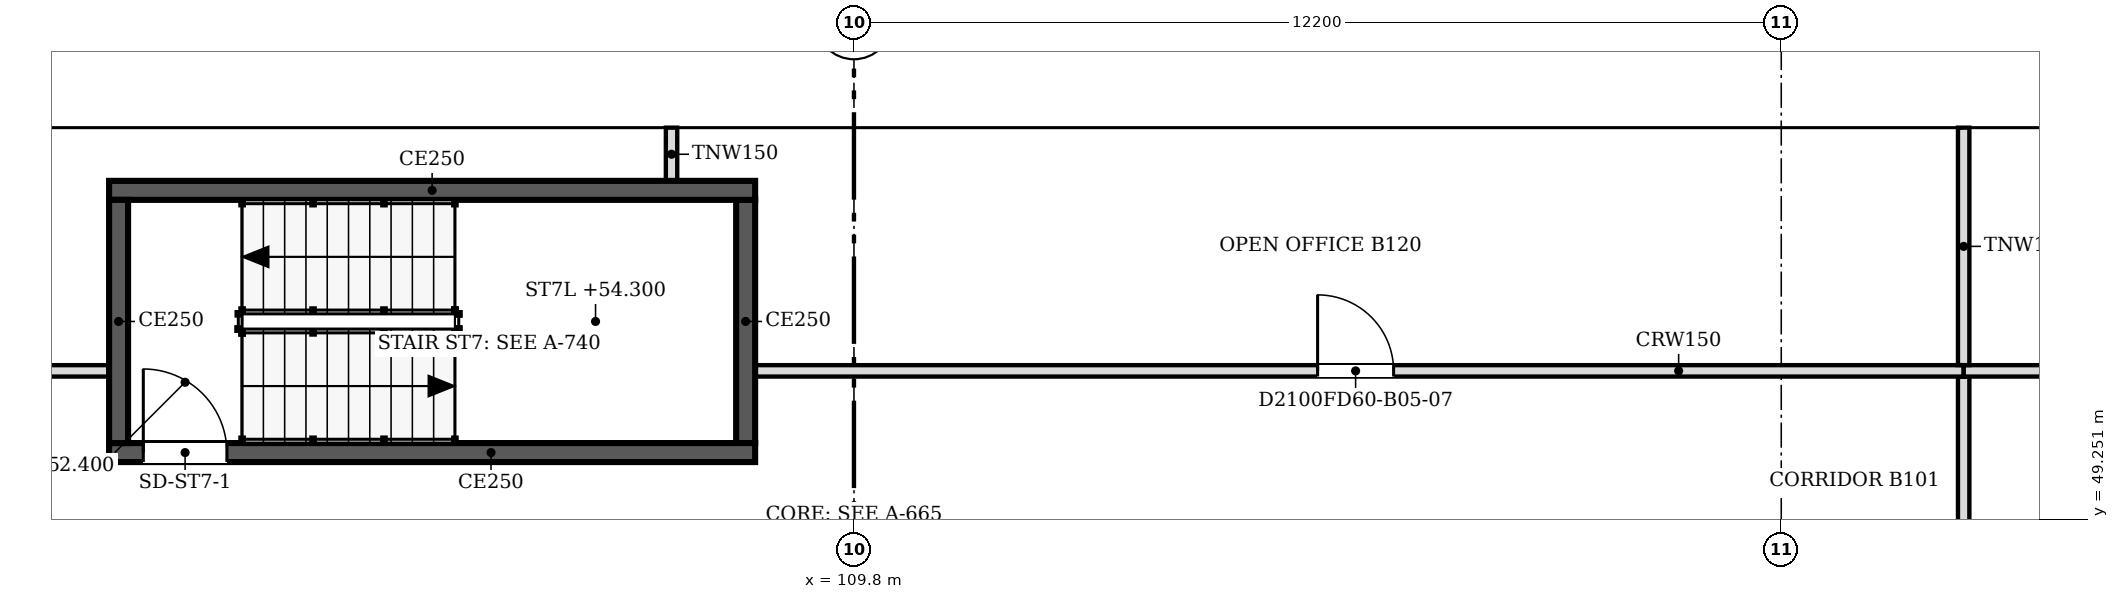
"""IFC4 building model, lengths in metres.
Left out: names, types, materials, properties, quantities, classifications, styles, units other than length and angle.
Written with IfcOpenShell. Run it as: python <this file> out.ifc"""

import sys

from ifc_helpers import new_model, si_unit, direction, frame, frame_2d, origin, place, context, subcontext, project, spatial, polyline, rectangle, outline, extrude, faceted_brep, source, transform, mapped, element, fill, save


model = new_model("IFC4")
c1 = context("Model", 3, precision=1e-05, world=origin(), true_north=direction((0.0, 1.0)))
c2 = subcontext(c1, "Body", "Model", "MODEL_VIEW")
j1 = project(units=[si_unit("LENGTHUNIT", "METRE"), si_unit("PLANEANGLEUNIT", "RADIAN")], contexts=[c1])
p1 = place(None, origin())
s1 = spatial("IfcSite", under=j1, at=p1, CompositionType="ELEMENT")
p2 = place(p1, origin())
s2 = spatial("IfcBuilding", under=s1, at=p2, CompositionType="ELEMENT")
p3 = place(p2, frame((0.0, 0.0, 52.4)))
s3 = spatial("IfcBuildingStorey", under=s2, at=p3, CompositionType="ELEMENT", Elevation=52.4)
m1 = source(origin(), c2, "Body", "Brep", [
    faceted_brep([(3.003, -0.25, 0.0), (6.053, -0.25, 3.8), (3.003, -0.25, 7.6), (0.0, -0.25, 3.8), (0.047, 0.25, 3.859), (3.003, 0.25, 7.6), (6.053, 0.25, 3.8), (3.003, 0.25, 0.0), (0.047, 0.25, 3.741), (0.0, 0.0, 3.8)], [[[0, 1, 2, 3]], [[4, 5, 6, 7, 8]], [[7, 6, 1, 0]], [[6, 5, 2, 1]], [[5, 4, 9, 3, 2]], [[8, 7, 0, 3, 9]], [[8, 9, 4]]]),
])
p4 = place(p3, frame((128.053, 54.65, -3.8), z_axis=(0.0, 0.0, 1.0), x_axis=(-1.0, 0.0, 0.0)))
e1 = element("IfcWall", 1, at=p4, inside=s3, PredefinedType="SOLIDWALL", context=c2, shape_type="MappedRepresentation", body=[
    mapped(m1, transform((0.0, 0.0, 0.0), scale=1.0)),
])
m2 = source(origin(), c2, "Body", "SweptSolid", [
    extrude(outline(polyline([(3.005, 0.401), (5.733, 3.8), (3.005, 7.199), (0.319, 3.8), (3.005, 0.401)])), frame((0.0, 0.26, 0.0), z_axis=(0.0, -1.0, 0.0), x_axis=(1.0, 0.0, 0.0)), (0.0, 0.0, 1.0), 0.52),
])
p5 = place(p4, origin())
e2 = element("IfcOpeningElement", 2, at=p5, cuts=e1, PredefinedType="OPENING", context=c2, shape_type="MappedRepresentation", body=[
    mapped(m2, transform((0.0, 0.0, 0.0), scale=1.0)),
])
m3 = source(origin(), c2, "Body", "SweptSolid", [
    extrude(outline(polyline([(3.05, 0.0), (6.1, 3.8), (3.05, 7.6), (0.0, 3.8), (3.05, 0.0)])), frame((0.0, 0.25, 0.0), z_axis=(0.0, -1.0, 0.0), x_axis=(1.0, 0.0, 0.0)), (0.0, 0.0, 1.0), 0.5),
])
p6 = place(p3, frame((122.0, 54.65, -3.8), z_axis=(0.0, 0.0, 1.0), x_axis=(-1.0, 0.0, 0.0)))
e3 = element("IfcWall", 3, at=p6, inside=s3, PredefinedType="SOLIDWALL", context=c2, shape_type="MappedRepresentation", body=[
    mapped(m3, transform((0.0, 0.0, 0.0), scale=1.0)),
])
m4 = source(origin(), c2, "Body", "SweptSolid", [
    extrude(outline(polyline([(3.05, 0.399), (5.78, 3.8), (3.05, 7.2), (0.321, 3.8), (3.05, 0.399)])), frame((0.0, 0.26, 0.0), z_axis=(0.0, -1.0, 0.0), x_axis=(1.0, 0.0, 0.0)), (0.0, 0.0, 1.0), 0.52),
])
p7 = place(p6, origin())
e4 = element("IfcOpeningElement", 4, at=p7, cuts=e3, PredefinedType="OPENING", context=c2, shape_type="MappedRepresentation", body=[
    mapped(m4, transform((0.0, 0.0, 0.0), scale=1.0)),
])
m5 = source(origin(), c2, "Body", "Brep", [
    faceted_brep([(3.05, -0.25, 0.0), (6.1, -0.25, 3.8), (6.1, -0.25, 3.8), (3.05, -0.25, 7.6), (0.0, -0.25, 3.8), (0.0, 0.25, 3.8), (3.05, 0.25, 7.6), (6.1, 0.25, 3.8), (6.1, 0.25, 3.8), (3.05, 0.25, 0.0)], [[[0, 1, 2, 3, 4]], [[5, 6, 7, 8, 9]], [[9, 8, 1, 0]], [[7, 6, 3, 2]], [[6, 5, 4, 3]], [[5, 9, 0, 4]], [[1, 8, 7, 2]]]),
])
p8 = place(p3, frame((115.9, 54.65, -3.8), z_axis=(0.0, 0.0, 1.0), x_axis=(-1.0, 0.0, 0.0)))
e5 = element("IfcWall", 5, at=p8, inside=s3, PredefinedType="SOLIDWALL", context=c2, shape_type="MappedRepresentation", body=[
    mapped(m5, transform((0.0, 0.0, 0.0), scale=1.0)),
])
p9 = place(p8, origin())
e6 = element("IfcOpeningElement", 6, at=p9, cuts=e5, PredefinedType="OPENING", context=c2, shape_type="MappedRepresentation", body=[
    mapped(m4, transform((0.0, 0.0, 0.0), scale=1.0)),
])
p10 = place(p3, frame((109.8, 54.65, -3.8), z_axis=(0.0, 0.0, 1.0), x_axis=(-1.0, 0.0, 0.0)))
e7 = element("IfcWall", 7, at=p10, inside=s3, PredefinedType="SOLIDWALL", context=c2, shape_type="MappedRepresentation", body=[
    mapped(m3, transform((0.0, 0.0, 0.0), scale=1.0)),
])
p11 = place(p10, origin())
e8 = element("IfcOpeningElement", 8, at=p11, cuts=e7, PredefinedType="OPENING", context=c2, shape_type="MappedRepresentation", body=[
    mapped(m4, transform((0.0, 0.0, 0.0), scale=1.0)),
])
p12 = place(p3, frame((103.7, 54.65, -3.8), z_axis=(0.0, 0.0, 1.0), x_axis=(-1.0, 0.0, 0.0)))
e9 = element("IfcWall", 9, at=p12, inside=s3, PredefinedType="SOLIDWALL", context=c2, shape_type="MappedRepresentation", body=[
    mapped(m5, transform((0.0, 0.0, 0.0), scale=1.0)),
])
p13 = place(p12, origin())
e10 = element("IfcOpeningElement", 10, at=p13, cuts=e9, PredefinedType="OPENING", context=c2, shape_type="MappedRepresentation", body=[
    mapped(m4, transform((0.0, 0.0, 0.0), scale=1.0)),
])
p14 = place(p2, frame((0.0, 0.0, 56.2)))
s4 = spatial("IfcBuildingStorey", under=s2, at=p14, CompositionType="ELEMENT", Elevation=56.2)
m6 = source(origin(), c2, "Body", "Brep", [
    faceted_brep([(0.047, -0.25, 0.0), (3.05, -0.25, 3.8), (0.047, -0.25, 7.6), (0.0, -0.25, 7.54), (0.0, -0.25, 0.06), (0.093, 0.25, 7.541), (3.05, 0.25, 3.8), (0.093, 0.25, 0.059), (0.047, 0.0, 0.0), (0.047, 0.0, 7.6)], [[[0, 1, 2, 3, 4]], [[5, 6, 7]], [[7, 6, 1, 0, 8]], [[6, 5, 9, 2, 1]], [[3, 2, 9]], [[8, 0, 4]], [[7, 8, 4, 3, 9, 5]]]),
])
p15 = place(p14, frame((128.1, 54.65, -3.8), z_axis=(0.0, 0.0, 1.0), x_axis=(-1.0, 0.0, 0.0)))
e11 = element("IfcWall", 11, at=p15, inside=s4, PredefinedType="SOLIDWALL", context=c2, shape_type="MappedRepresentation", body=[
    mapped(m6, transform((0.0, 0.0, 0.0), scale=1.0)),
])
m7 = source(origin(), c2, "Body", "SweptSolid", [
    extrude(outline(polyline([(0.247, 0.656), (2.731, 3.8), (0.247, 6.944), (0.247, 0.656)])), frame((0.0, 0.26, 0.0), z_axis=(0.0, -1.0, 0.0), x_axis=(1.0, 0.0, 0.0)), (0.0, 0.0, 1.0), 0.52),
])
p16 = place(p15, origin())
e12 = element("IfcOpeningElement", 12, at=p16, cuts=e11, PredefinedType="OPENING", context=c2, shape_type="MappedRepresentation", body=[
    mapped(m7, transform((0.0, 0.0, 0.0), scale=1.0)),
])
m8 = source(origin(), c2, "Body", "SweptSolid", [
    extrude(outline(polyline([(3.05, 0.0), (6.1, 3.8), (3.05, 7.6), (0.0, 3.8), (3.05, 0.0)])), frame((0.0, 0.25, 0.0), z_axis=(0.0, -1.0, 0.0), x_axis=(1.0, 0.0, 0.0)), (0.0, 0.0, 1.0), 0.5),
])
p17 = place(p14, frame((125.05, 54.65, -3.8), z_axis=(0.0, 0.0, 1.0), x_axis=(-1.0, 0.0, 0.0)))
e13 = element("IfcWall", 13, at=p17, inside=s4, PredefinedType="SOLIDWALL", context=c2, shape_type="MappedRepresentation", body=[
    mapped(m8, transform((0.0, 0.0, 0.0), scale=1.0)),
])
m9 = source(origin(), c2, "Body", "SweptSolid", [
    extrude(outline(polyline([(3.05, 0.399), (5.78, 3.8), (3.05, 7.201), (0.321, 3.8), (3.05, 0.399)])), frame((0.0, 0.26, 0.0), z_axis=(0.0, -1.0, 0.0), x_axis=(1.0, 0.0, 0.0)), (0.0, 0.0, 1.0), 0.52),
])
p18 = place(p17, origin())
e14 = element("IfcOpeningElement", 14, at=p18, cuts=e13, PredefinedType="OPENING", context=c2, shape_type="MappedRepresentation", body=[
    mapped(m9, transform((0.0, 0.0, 0.0), scale=1.0)),
])
m10 = source(origin(), c2, "Body", "Brep", [
    faceted_brep([(3.05, -0.25, 0.0), (6.1, -0.25, 3.8), (6.1, -0.25, 3.8), (3.05, -0.25, 7.6), (0.0, -0.25, 3.8), (0.0, 0.25, 3.8), (3.05, 0.25, 7.6), (6.1, 0.25, 3.8), (6.1, 0.25, 3.8), (3.05, 0.25, 0.0)], [[[0, 1, 2, 3, 4]], [[5, 6, 7, 8, 9]], [[9, 8, 1, 0]], [[7, 6, 3, 2]], [[6, 5, 4, 3]], [[5, 9, 0, 4]], [[1, 8, 7, 2]]]),
])
p19 = place(p14, frame((118.95, 54.65, -3.8), z_axis=(0.0, 0.0, 1.0), x_axis=(-1.0, 0.0, 0.0)))
e15 = element("IfcWall", 15, at=p19, inside=s4, PredefinedType="SOLIDWALL", context=c2, shape_type="MappedRepresentation", body=[
    mapped(m10, transform((0.0, 0.0, 0.0), scale=1.0)),
])
p20 = place(p19, origin())
e16 = element("IfcOpeningElement", 16, at=p20, cuts=e15, PredefinedType="OPENING", context=c2, shape_type="MappedRepresentation", body=[
    mapped(m9, transform((0.0, 0.0, 0.0), scale=1.0)),
])
p21 = place(p14, frame((112.85, 54.65, -3.8), z_axis=(0.0, 0.0, 1.0), x_axis=(-1.0, 0.0, 0.0)))
e17 = element("IfcWall", 17, at=p21, inside=s4, PredefinedType="SOLIDWALL", context=c2, shape_type="MappedRepresentation", body=[
    mapped(m8, transform((0.0, 0.0, 0.0), scale=1.0)),
])
p22 = place(p21, origin())
e18 = element("IfcOpeningElement", 18, at=p22, cuts=e17, PredefinedType="OPENING", context=c2, shape_type="MappedRepresentation", body=[
    mapped(m9, transform((0.0, 0.0, 0.0), scale=1.0)),
])
p23 = place(p14, frame((106.75, 54.65, -3.8), z_axis=(0.0, 0.0, 1.0), x_axis=(-1.0, 0.0, 0.0)))
e19 = element("IfcWall", 19, at=p23, inside=s4, PredefinedType="SOLIDWALL", context=c2, shape_type="MappedRepresentation", body=[
    mapped(m8, transform((0.0, 0.0, 0.0), scale=1.0)),
])
p24 = place(p23, origin())
e20 = element("IfcOpeningElement", 20, at=p24, cuts=e19, PredefinedType="OPENING", context=c2, shape_type="MappedRepresentation", body=[
    mapped(m9, transform((0.0, 0.0, 0.0), scale=1.0)),
])
p25 = place(p14, frame((100.65, 54.65, -3.8), z_axis=(0.0, 0.0, 1.0), x_axis=(-1.0, 0.0, 0.0)))
e21 = element("IfcWall", 21, at=p25, inside=s4, PredefinedType="SOLIDWALL", context=c2, shape_type="MappedRepresentation", body=[
    mapped(m10, transform((0.0, 0.0, 0.0), scale=1.0)),
])
p26 = place(p25, origin())
e22 = element("IfcOpeningElement", 22, at=p26, cuts=e21, PredefinedType="OPENING", context=c2, shape_type="MappedRepresentation", body=[
    mapped(m9, transform((0.0, 0.0, 0.0), scale=1.0)),
])
p27 = place(p3, frame((108.5, 50.125, 0.0), z_axis=(0.0, 0.0, 1.0), x_axis=(-1.0, 0.0, 0.0)))
e23 = element("IfcWall", 23, at=p27, inside=s3, PredefinedType="SOLIDWALL", context=c2, shape_type="SweptSolid", body=[
    extrude(rectangle(XDim=8.5, YDim=0.25, at=frame_2d((4.25, 0.0))), origin(), (0.0, 0.0, 1.0), 3.8),
])
m11 = source(origin(), c2, "Body", "SweptSolid", [
    extrude(rectangle(XDim=1.1, YDim=2.1, at=frame_2d((0.55, 1.05))), frame((0.0, 0.135, 0.0), z_axis=(0.0, -1.0, 0.0), x_axis=(1.0, 0.0, 0.0)), (0.0, 0.0, 1.0), 0.27),
])
p28 = place(p27, frame((6.95, 0.0, 0.0)))
e24 = element("IfcOpeningElement", 24, at=p28, cuts=e23, PredefinedType="OPENING", context=c2, shape_type="MappedRepresentation", body=[
    mapped(m11, transform((0.0, 0.0, 0.0), scale=1.0)),
])
p29 = place(p3, frame((100.125, 50.25, 0.0), z_axis=(0.0, 0.0, 1.0), x_axis=(0.0, 1.0, 0.0)))
e25 = element("IfcWall", 25, at=p29, inside=s3, PredefinedType="SOLIDWALL", context=c2, shape_type="SweptSolid", body=[
    extrude(rectangle(XDim=3.2, YDim=0.25, at=frame_2d((1.6, 0.0))), origin(), (0.0, 0.0, 1.0), 3.8),
])
p30 = place(p3, frame((100.0, 53.575, 0.0), z_axis=(0.0, 0.0, 1.0), x_axis=(1.0, 0.0, 0.0)))
e26 = element("IfcWall", 26, at=p30, inside=s3, PredefinedType="SOLIDWALL", context=c2, shape_type="SweptSolid", body=[
    extrude(rectangle(XDim=8.5, YDim=0.25, at=frame_2d((4.25, 0.0))), origin(), (0.0, 0.0, 1.0), 3.8),
])
p31 = place(p3, frame((108.375, 53.45, 0.0), z_axis=(0.0, 0.0, 1.0), x_axis=(0.0, -1.0, 0.0)))
e27 = element("IfcWall", 27, at=p31, inside=s3, PredefinedType="SOLIDWALL", context=c2, shape_type="SweptSolid", body=[
    extrude(rectangle(XDim=3.2, YDim=0.25, at=frame_2d((1.6, 0.0))), origin(), (0.0, 0.0, 1.0), 3.8),
])
p32 = place(p3, frame((124.4, 51.124, 0.0), z_axis=(0.0, 0.0, 1.0), x_axis=(0.0, -1.0, 0.0)))
e28 = element("IfcWall", 28, at=p32, inside=s3, PredefinedType="PARTITIONING", context=c2, shape_type="SweptSolid", body=[
    extrude(rectangle(XDim=14.524, YDim=0.15, at=frame_2d((7.262, 0.0))), origin(), (0.0, 0.0, 1.0), 3.067),
])
m12 = source(origin(), c2, "Body", "SweptSolid", [
    extrude(rectangle(XDim=1.0, YDim=2.1, at=frame_2d((0.5, 1.05))), frame((0.0, 0.085, 0.0), z_axis=(0.0, -1.0, 0.0), x_axis=(1.0, 0.0, 0.0)), (0.0, 0.0, 1.0), 0.17),
])
p33 = place(p32, frame((3.724, 0.0, 0.0)))
e29 = element("IfcOpeningElement", 29, at=p33, cuts=e28, PredefinedType="OPENING", context=c2, shape_type="MappedRepresentation", body=[
    mapped(m12, transform((0.0, 0.0, 0.0), scale=1.0)),
])
p34 = place(p3, frame((95.276, 51.2, 0.0), z_axis=(0.0, 0.0, 1.0), x_axis=(1.0, 0.0, 0.0)))
e30 = element("IfcWall", 30, at=p34, inside=s3, PredefinedType="PARTITIONING", context=c2, shape_type="SweptSolid", body=[
    extrude(rectangle(XDim=4.724, YDim=0.15, at=frame_2d((2.362, 0.0))), origin(), (0.0, 0.0, 1.0), 3.067),
])
p35 = place(p34, frame((1.9, 0.0, 0.0)))
e31 = element("IfcOpeningElement", 31, at=p35, cuts=e30, PredefinedType="OPENING", context=c2, shape_type="MappedRepresentation", body=[
    mapped(m12, transform((0.0, 0.0, 0.0), scale=1.0)),
])
p36 = place(p3, frame((108.5, 51.2, 0.0), z_axis=(0.0, 0.0, 1.0), x_axis=(1.0, 0.0, 0.0)))
e32 = element("IfcWall", 32, at=p36, inside=s3, PredefinedType="PARTITIONING", context=c2, shape_type="SweptSolid", body=[
    extrude(rectangle(XDim=15.9, YDim=0.15, at=frame_2d((7.95, 0.0))), origin(), (0.0, 0.0, 1.0), 3.067),
])
p37 = place(p36, frame((7.4, 0.0, 0.0)))
e33 = element("IfcOpeningElement", 33, at=p37, cuts=e32, PredefinedType="OPENING", context=c2, shape_type="MappedRepresentation", body=[
    mapped(m12, transform((0.0, 0.0, 0.0), scale=1.0)),
])
p38 = place(p3, frame((124.401, 51.2, 0.0), z_axis=(0.0, 0.0, 1.0), x_axis=(1.0, 0.0, 0.0)))
e34 = element("IfcWall", 34, at=p38, inside=s3, PredefinedType="PARTITIONING", context=c2, shape_type="SweptSolid", body=[
    extrude(rectangle(XDim=4.549, YDim=0.15, at=frame_2d((2.274, 0.0))), origin(), (0.0, 0.0, 1.0), 3.067),
])
m13 = source(origin(), c2, "Body", "SweptSolid", [
    extrude(rectangle(XDim=0.9, YDim=2.1, at=frame_2d((0.45, 1.05))), frame((0.0, 0.085, 0.0), z_axis=(0.0, -1.0, 0.0), x_axis=(1.0, 0.0, 0.0)), (0.0, 0.0, 1.0), 0.17),
])
p39 = place(p38, frame((1.8, 0.0, 0.0)))
e35 = element("IfcOpeningElement", 35, at=p39, cuts=e34, PredefinedType="OPENING", context=c2, shape_type="MappedRepresentation", body=[
    mapped(m13, transform((0.0, 0.0, 0.0), scale=1.0)),
])
p40 = place(p3, frame((124.4, 51.276, 0.0), z_axis=(0.0, 0.0, 1.0), x_axis=(0.0, 1.0, 0.0)))
e36 = element("IfcWall", 36, at=p40, inside=s3, PredefinedType="PARTITIONING", context=c2, shape_type="SweptSolid", body=[
    extrude(rectangle(XDim=3.124, YDim=0.15, at=frame_2d((1.562, 0.0))), origin(), (0.0, 0.0, 1.0), 3.067),
])
p41 = place(p3, frame((107.4, 53.7, 0.0), z_axis=(0.0, 0.0, 1.0), x_axis=(0.0, 1.0, 0.0)))
e37 = element("IfcWall", 37, at=p41, inside=s3, PredefinedType="PARTITIONING", context=c2, shape_type="SweptSolid", body=[
    extrude(rectangle(XDim=0.7, YDim=0.15, at=frame_2d((0.35, 0.0))), origin(), (0.0, 0.0, 1.0), 3.067),
])
m14 = source(origin(), c2, "Body", "SweptSolid", [
    extrude(rectangle(XDim=1.1, YDim=2.1, at=frame_2d((0.55, 1.05))), frame((0.0, 0.025, 0.0), z_axis=(0.0, -1.0, 0.0), x_axis=(1.0, 0.0, 0.0)), (0.0, 0.0, 1.0), 0.05),
])
p42 = place(p28, origin())
e38 = element("IfcDoor", 38, at=p42, inside=s3, OperationType="SINGLE_SWING_RIGHT", PredefinedType="DOOR", context=c2, shape_type="MappedRepresentation", body=[
    mapped(m14, transform((0.0, 0.0, 0.0), scale=1.0)),
])
fill(e24, e38)
m15 = source(origin(), c2, "Body", "SweptSolid", [
    extrude(rectangle(XDim=1.0, YDim=2.1, at=frame_2d((0.5, 1.05))), frame((0.0, 0.025, 0.0), z_axis=(0.0, -1.0, 0.0), x_axis=(1.0, 0.0, 0.0)), (0.0, 0.0, 1.0), 0.05),
])
p43 = place(p37, origin())
e39 = element("IfcDoor", 39, at=p43, inside=s3, OperationType="SINGLE_SWING_LEFT", PredefinedType="DOOR", context=c2, shape_type="MappedRepresentation", body=[
    mapped(m15, transform((0.0, 0.0, 0.0), scale=1.0)),
])
fill(e33, e39)
save(model, sys.argv[1])
